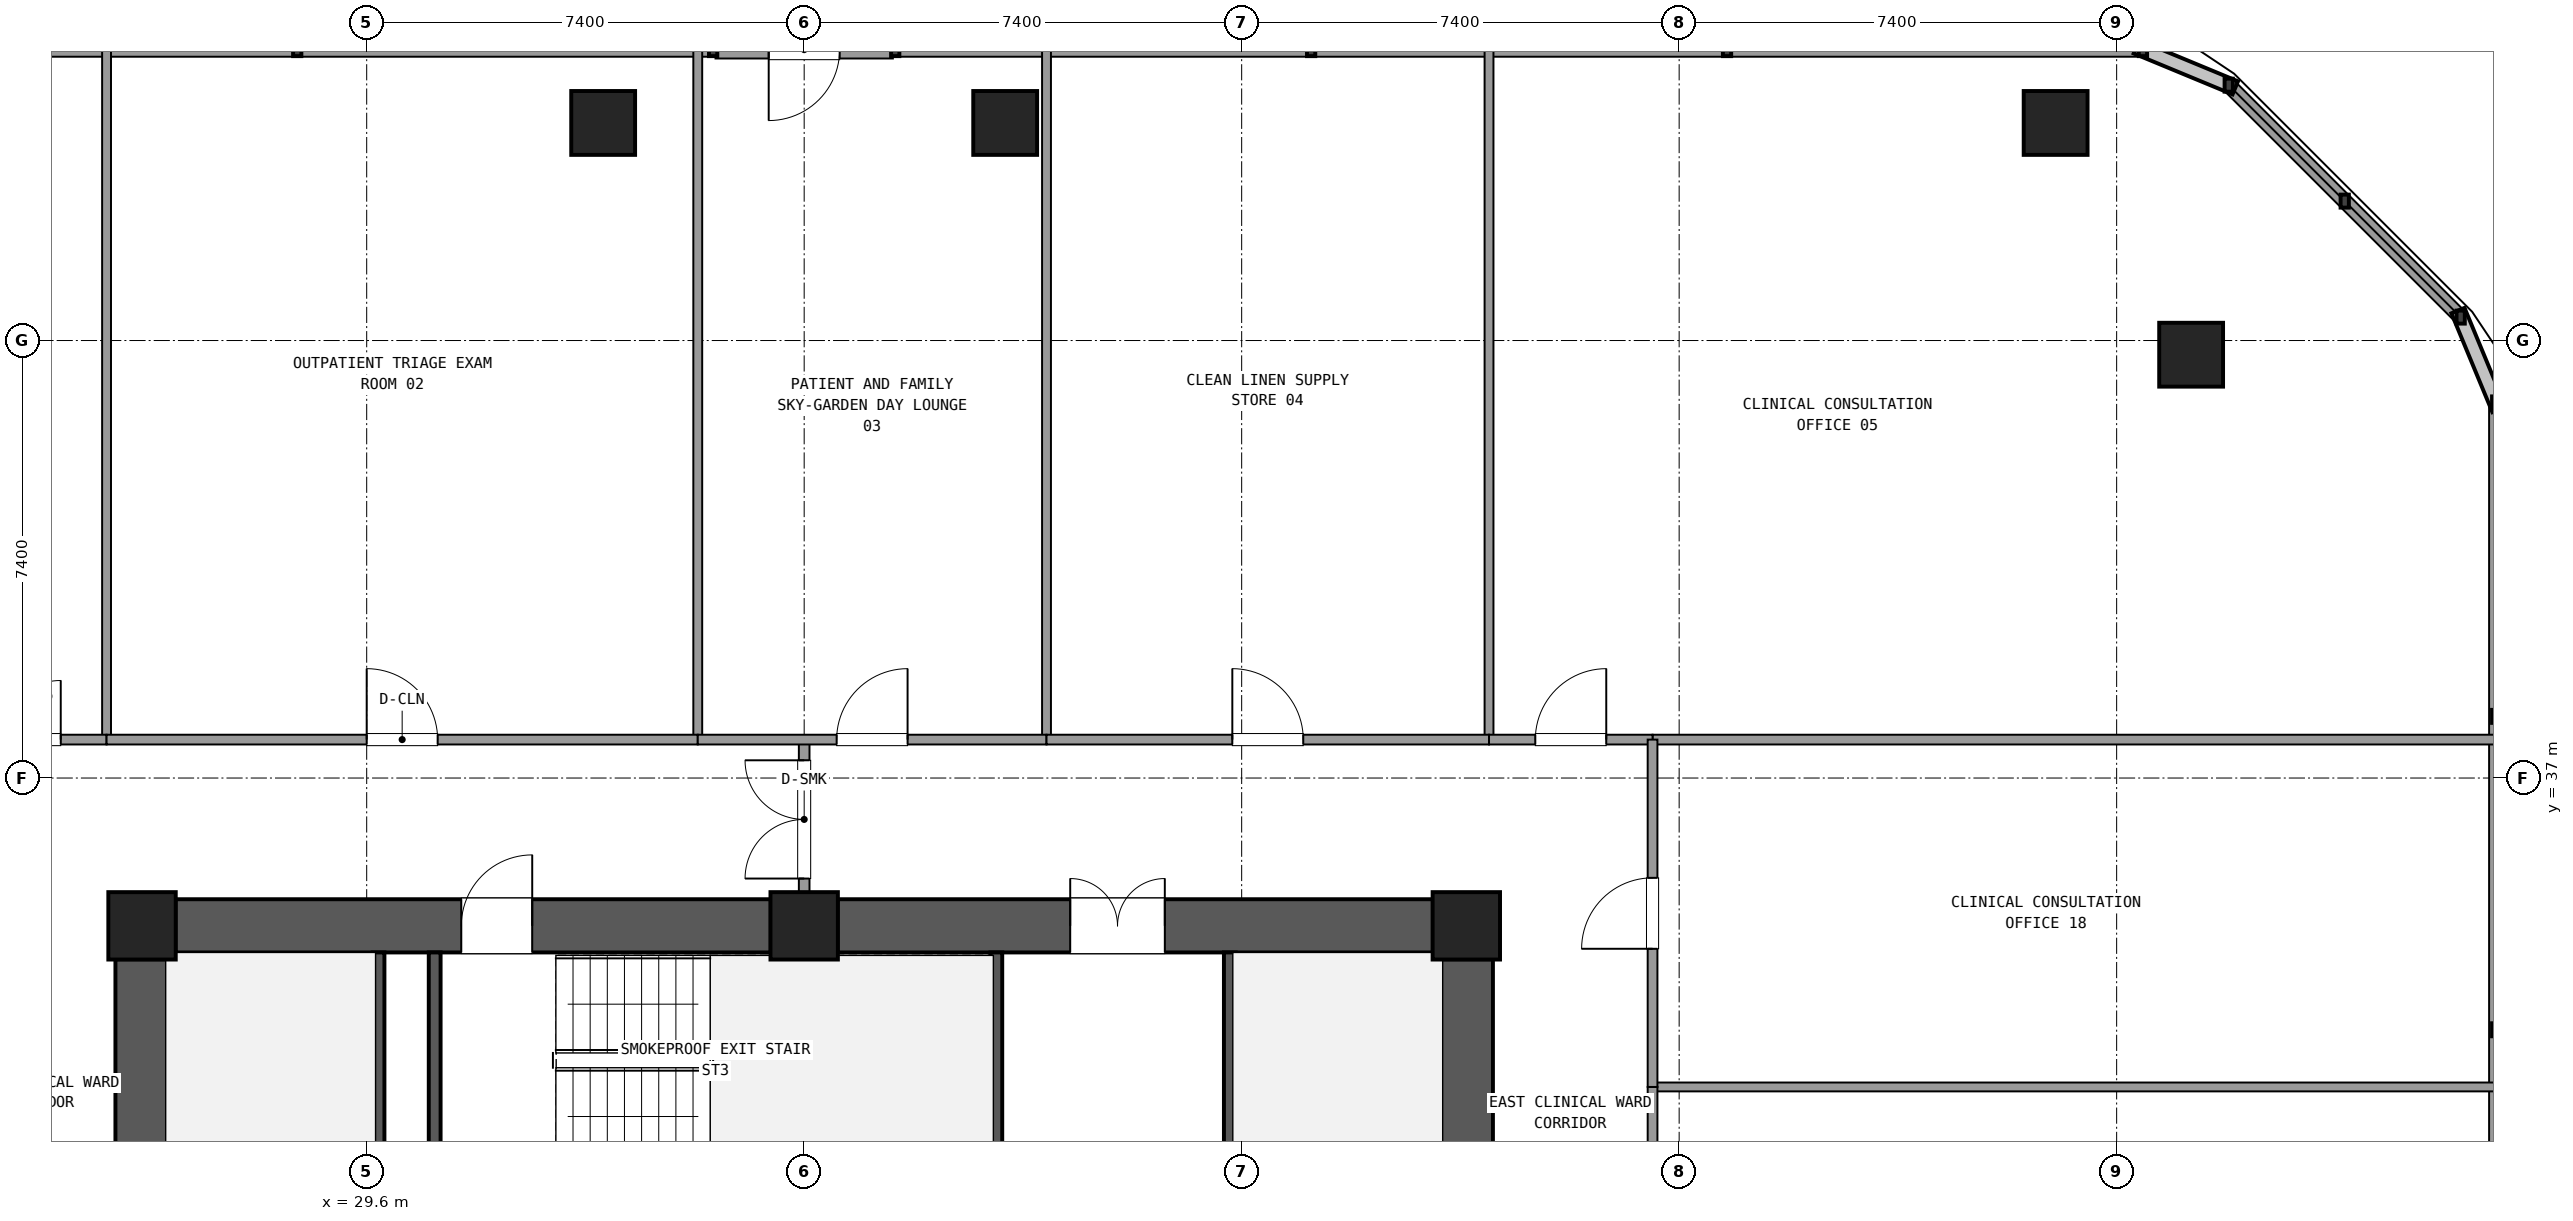
"""IFC4 building model, lengths in metres.
Left out: names, types, materials, properties, quantities, classifications, styles, units other than length and angle.
Written with IfcOpenShell. Run it as: python <this file> out.ifc"""

import sys

from ifc_helpers import new_model, si_unit, direction, frame, frame_2d, origin, origin_2d, place, context, subcontext, project, spatial, rectangle, extrude, element, fill, save


model = new_model("IFC4")
c1 = context("Model", 3, precision=1e-05, world=origin(), true_north=direction((0.0, 1.0)))
c2 = subcontext(c1, "Body", "Model", "MODEL_VIEW")
j1 = project(units=[si_unit("LENGTHUNIT", "METRE"), si_unit("PLANEANGLEUNIT", "RADIAN")], contexts=[c1])
p1 = place(None, origin())
s1 = spatial("IfcSite", under=j1, at=p1, CompositionType="ELEMENT")
p2 = place(p1, origin())
s2 = spatial("IfcBuilding", under=s1, at=p2, CompositionType="ELEMENT")
p3 = place(p2, frame((0.0, 0.0, 45.54)))
s3 = spatial("IfcBuildingStorey", under=s2, at=p3, CompositionType="ELEMENT", Elevation=45.54)
for number, where, z_axis, x_axis in (
    (1, (48.2, 34.5, 0.0), (0.0, 0.0, 1.0), (1.0, 0.0, 0.0)),
    (2, (37.0, 34.5, 0.0), (0.0, 0.0, 1.0), (1.0, 0.0, 0.0)),
    (3, (25.8, 34.5, 0.0), (0.0, 0.0, 1.0), (1.0, 0.0, 0.0)),
):
    element("IfcColumn", number, at=place(p3, frame(where, z_axis=z_axis, x_axis=x_axis)), inside=s3, PredefinedType="COLUMN", context=c2, shape_type="SweptSolid", body=[
        extrude(rectangle(XDim=1.14, YDim=1.14, at=origin_2d()), origin(), (0.0, 0.0, 1.0), 3.6),
    ])
p4 = place(p3, frame((48.2, 26.465, 0.0), z_axis=(0.0, 0.0, 1.0), x_axis=(0.0, 1.0, 0.0)))
e4 = element("IfcWall", 4, at=p4, inside=s3, PredefinedType="SHEAR", context=c2, shape_type="SweptSolid", body=[
    extrude(rectangle(XDim=7.47, YDim=0.9, at=frame_2d((3.735, 0.0))), origin(), (0.0, 0.0, 1.0), 3.32),
])
p5 = place(p3, frame((47.635, 34.5, 0.0), z_axis=(0.0, 0.0, 1.0), x_axis=(-1.0, 0.0, 0.0)))
e5 = element("IfcWall", 5, at=p5, inside=s3, PredefinedType="SHEAR", context=c2, shape_type="SweptSolid", body=[
    extrude(rectangle(XDim=10.07, YDim=0.9, at=frame_2d((5.035, 0.0))), origin(), (0.0, 0.0, 1.0), 3.32),
])
p6 = place(p5, frame((4.535, 0.0, 0.0)))
e6 = element("IfcOpeningElement", 6, at=p6, cuts=e5, PredefinedType="OPENING", context=c2, shape_type="SweptSolid", body=[
    extrude(rectangle(XDim=1.6, YDim=2.2, at=frame_2d((0.8, 1.1))), frame((0.0, 0.46, 0.0), z_axis=(0.0, -1.0, 0.0), x_axis=(1.0, 0.0, 0.0)), (0.0, 0.0, 1.0), 0.92),
])
p7 = place(p3, frame((36.435, 34.5, 0.0), z_axis=(0.0, 0.0, 1.0), x_axis=(-1.0, 0.0, 0.0)))
e7 = element("IfcWall", 7, at=p7, inside=s3, PredefinedType="SHEAR", context=c2, shape_type="SweptSolid", body=[
    extrude(rectangle(XDim=10.07, YDim=0.9, at=frame_2d((5.035, 0.0))), origin(), (0.0, 0.0, 1.0), 3.32),
])
p8 = place(p7, frame((4.035, 0.0, 0.0)))
e8 = element("IfcOpeningElement", 8, at=p8, cuts=e7, PredefinedType="OPENING", context=c2, shape_type="SweptSolid", body=[
    extrude(rectangle(XDim=1.2, YDim=2.15, at=frame_2d((0.6, 1.075))), frame((0.0, 0.46, 0.0), z_axis=(0.0, -1.0, 0.0), x_axis=(1.0, 0.0, 0.0)), (0.0, 0.0, 1.0), 0.92),
])
p9 = place(p3, frame((25.8, 33.935, 0.0), z_axis=(0.0, 0.0, 1.0), x_axis=(0.0, -1.0, 0.0)))
e9 = element("IfcWall", 9, at=p9, inside=s3, PredefinedType="SHEAR", context=c2, shape_type="SweptSolid", body=[
    extrude(rectangle(XDim=7.47, YDim=0.9, at=frame_2d((3.735, 0.0))), origin(), (0.0, 0.0, 1.0), 3.32),
])
for number, where, z_axis, x_axis in (
    (10, (60.46, 44.16, 0.0), (0.0, 0.0, 1.0), (1.0, 0.0, 0.0)),
    (11, (58.168, 48.08, 0.0), (0.0, 0.0, 1.0), (1.0, 0.0, 0.0)),
    (12, (40.4, 48.08, 0.0), (0.0, 0.0, 1.0), (1.0, 0.0, 0.0)),
    (13, (33.6, 48.08, 0.0), (0.0, 0.0, 1.0), (1.0, 0.0, 0.0)),
):
    element("IfcColumn", number, at=place(p3, frame(where, z_axis=z_axis, x_axis=x_axis)), inside=s3, PredefinedType="COLUMN", context=c2, shape_type="SweptSolid", body=[
        extrude(rectangle(XDim=1.08, YDim=1.08, at=origin_2d()), origin(), (0.0, 0.0, 1.0), 3.6),
    ])
p10 = place(p3, frame((65.62, 27.44, 0.0), z_axis=(0.0, 0.0, 1.0), x_axis=(0.0, 1.0, 0.0)))
e14 = element("IfcWall", 14, at=p10, inside=s3, PredefinedType="SOLIDWALL", context=c2, shape_type="SweptSolid", body=[
    extrude(rectangle(XDim=15.905, YDim=0.24, at=frame_2d((7.953, 0.0))), origin(), (0.0, 0.0, 1.0), 0.85),
])
p11 = place(p3, frame((65.019, 44.796, 0.0), z_axis=(0.0, 0.0, 1.0), x_axis=(-0.707106781187, 0.707106781187, 0.0)))
e15 = element("IfcWall", 15, at=p11, inside=s3, PredefinedType="SOLIDWALL", context=c2, shape_type="SweptSolid", body=[
    extrude(rectangle(XDim=5.548, YDim=0.24, at=frame_2d((2.774, 0.0))), origin(), (0.0, 0.0, 1.0), 0.85),
])
p12 = place(p3, frame((38.5, 49.32, 0.0), z_axis=(0.0, 0.0, 1.0), x_axis=(-1.0, 0.0, 0.0)))
e16 = element("IfcWall", 16, at=p12, inside=s3, PredefinedType="SOLIDWALL", context=c2, shape_type="SweptSolid", body=[
    extrude(rectangle(XDim=3.0, YDim=0.3, at=frame_2d((1.5, 0.0))), origin(), (0.0, 0.0, 1.0), 2.65),
])
p13 = place(p12, frame((0.9, 0.0, 0.0)))
e17 = element("IfcOpeningElement", 17, at=p13, cuts=e16, PredefinedType="OPENING", context=c2, shape_type="SweptSolid", body=[
    extrude(rectangle(XDim=1.2, YDim=2.2, at=frame_2d((0.6, 1.1))), frame((0.0, 0.16, 0.0), z_axis=(0.0, -1.0, 0.0), x_axis=(1.0, 0.0, 0.0)), (0.0, 0.0, 1.0), 0.32),
])
for number, where, z_axis, x_axis in (
    (18, (59.645, 49.32, 0.0), (0.0, 0.0, 1.0), (-1.0, 0.0, 0.0)),
    (19, (35.46, 49.32, 0.0), (0.0, 0.0, 1.0), (-1.0, 0.0, 0.0)),
):
    element("IfcWall", number, at=place(p3, frame(where, z_axis=z_axis, x_axis=x_axis)), inside=s3, PredefinedType="SOLIDWALL", context=c2, shape_type="SweptSolid", body=[
        extrude(rectangle(XDim=21.105, YDim=0.24, at=frame_2d((10.552, 0.0))), origin(), (0.0, 0.0, 1.0), 0.85),
    ])
for number, where, z_axis, x_axis in (
    (20, (29.8, 24.65, 0.0), (0.0, 0.0, 1.0), (0.0, 1.0, 0.0)),
    (21, (44.2, 24.65, 0.0), (0.0, 0.0, 1.0), (0.0, 1.0, 0.0)),
):
    element("IfcWall", number, at=place(p3, frame(where, z_axis=z_axis, x_axis=x_axis)), inside=s3, PredefinedType="SHEAR", context=c2, shape_type="SweptSolid", body=[
        extrude(rectangle(XDim=9.4, YDim=0.2, at=frame_2d((4.7, 0.0))), origin(), (0.0, 0.0, 1.0), 3.32),
    ])
for number, where, z_axis, x_axis in (
    (22, (30.75, 30.36, 0.0), (0.0, 0.0, 1.0), (0.0, 1.0, 0.0)),
    (23, (40.25, 30.36, 0.0), (0.0, 0.0, 1.0), (0.0, 1.0, 0.0)),
):
    element("IfcWall", number, at=place(p3, frame(where, z_axis=z_axis, x_axis=x_axis)), inside=s3, PredefinedType="SHEAR", context=c2, shape_type="SweptSolid", body=[
        extrude(rectangle(XDim=3.69, YDim=0.2, at=frame_2d((1.845, 0.0))), origin(), (0.0, 0.0, 1.0), 3.32),
    ])
p14 = place(p3, frame((37.0, 34.95, 0.0), z_axis=(0.0, 0.0, 1.0), x_axis=(0.0, 1.0, 0.0)))
e24 = element("IfcWall", 24, at=p14, inside=s3, PredefinedType="PARTITIONING", context=c2, shape_type="SweptSolid", body=[
    extrude(rectangle(XDim=2.7, YDim=0.18, at=frame_2d((1.35, 0.0))), origin(), (0.0, 0.0, 1.0), 2.61),
])
p15 = place(p14, frame((0.35, 0.0, 0.0)))
e25 = element("IfcOpeningElement", 25, at=p15, cuts=e24, PredefinedType="OPENING", context=c2, shape_type="SweptSolid", body=[
    extrude(rectangle(XDim=2.0, YDim=2.2, at=frame_2d((1.0, 1.1))), frame((0.0, 0.1, 0.0), z_axis=(0.0, -1.0, 0.0), x_axis=(1.0, 0.0, 0.0)), (0.0, 0.0, 1.0), 0.2),
])
p16 = place(p3, frame((51.35, 37.65, 0.0), z_axis=(0.0, 0.0, 1.0), x_axis=(1.0, 0.0, 0.0)))
e26 = element("IfcWall", 26, at=p16, inside=s3, PredefinedType="PARTITIONING", context=c2, shape_type="SweptSolid", body=[
    extrude(rectangle(XDim=14.25, YDim=0.165, at=frame_2d((7.125, 0.0))), origin(), (0.0, 0.0, 1.0), 2.61),
])
p17 = place(p3, frame((25.2, 37.65, 0.0), z_axis=(0.0, 0.0, 1.0), x_axis=(0.0, 1.0, 0.0)))
e27 = element("IfcWall", 27, at=p17, inside=s3, PredefinedType="PARTITIONING", context=c2, shape_type="SweptSolid", body=[
    extrude(rectangle(XDim=11.65, YDim=0.15, at=frame_2d((5.825, 0.0))), origin(), (0.0, 0.0, 1.0), 2.61),
])
p18 = place(p3, frame((22.65, 37.65, 0.0), z_axis=(0.0, 0.0, 1.0), x_axis=(1.0, 0.0, 0.0)))
e28 = element("IfcWall", 28, at=p18, inside=s3, PredefinedType="PARTITIONING", context=c2, shape_type="SweptSolid", body=[
    extrude(rectangle(XDim=2.55, YDim=0.165, at=frame_2d((1.275, 0.0))), origin(), (0.0, 0.0, 1.0), 2.61),
])
p19 = place(p18, frame((0.775, 0.0, 0.0)))
e29 = element("IfcOpeningElement", 29, at=p19, cuts=e28, PredefinedType="OPENING", context=c2, shape_type="SweptSolid", body=[
    extrude(rectangle(XDim=1.0, YDim=2.15, at=frame_2d((0.5, 1.075))), frame((0.0, 0.093, 0.0), z_axis=(0.0, -1.0, 0.0), x_axis=(1.0, 0.0, 0.0)), (0.0, 0.0, 1.0), 0.185),
])
p20 = place(p3, frame((35.2, 37.65, 0.0), z_axis=(0.0, 0.0, 1.0), x_axis=(0.0, 1.0, 0.0)))
e30 = element("IfcWall", 30, at=p20, inside=s3, PredefinedType="PARTITIONING", context=c2, shape_type="SweptSolid", body=[
    extrude(rectangle(XDim=11.65, YDim=0.15, at=frame_2d((5.825, 0.0))), origin(), (0.0, 0.0, 1.0), 2.61),
])
p21 = place(p3, frame((25.2, 37.65, 0.0), z_axis=(0.0, 0.0, 1.0), x_axis=(1.0, 0.0, 0.0)))
e31 = element("IfcWall", 31, at=p21, inside=s3, PredefinedType="PARTITIONING", context=c2, shape_type="SweptSolid", body=[
    extrude(rectangle(XDim=10.0, YDim=0.165, at=frame_2d((5.0, 0.0))), origin(), (0.0, 0.0, 1.0), 2.61),
])
p22 = place(p21, frame((4.4, 0.0, 0.0)))
e32 = element("IfcOpeningElement", 32, at=p22, cuts=e31, PredefinedType="OPENING", context=c2, shape_type="SweptSolid", body=[
    extrude(rectangle(XDim=1.2, YDim=2.15, at=frame_2d((0.6, 1.075))), frame((0.0, 0.093, 0.0), z_axis=(0.0, -1.0, 0.0), x_axis=(1.0, 0.0, 0.0)), (0.0, 0.0, 1.0), 0.185),
])
p23 = place(p3, frame((41.099, 37.65, 0.0), z_axis=(0.0, 0.0, 1.0), x_axis=(0.0, 1.0, 0.0)))
e33 = element("IfcWall", 33, at=p23, inside=s3, PredefinedType="PARTITIONING", context=c2, shape_type="SweptSolid", body=[
    extrude(rectangle(XDim=11.65, YDim=0.15, at=frame_2d((5.825, 0.0))), origin(), (0.0, 0.0, 1.0), 2.61),
])
p24 = place(p3, frame((35.2, 37.65, 0.0), z_axis=(0.0, 0.0, 1.0), x_axis=(1.0, 0.0, 0.0)))
e34 = element("IfcWall", 34, at=p24, inside=s3, PredefinedType="PARTITIONING", context=c2, shape_type="SweptSolid", body=[
    extrude(rectangle(XDim=5.899, YDim=0.165, at=frame_2d((2.95, 0.0))), origin(), (0.0, 0.0, 1.0), 2.61),
])
p25 = place(p24, frame((2.349, 0.0, 0.0)))
e35 = element("IfcOpeningElement", 35, at=p25, cuts=e34, PredefinedType="OPENING", context=c2, shape_type="SweptSolid", body=[
    extrude(rectangle(XDim=1.2, YDim=2.15, at=frame_2d((0.6, 1.075))), frame((0.0, 0.093, 0.0), z_axis=(0.0, -1.0, 0.0), x_axis=(1.0, 0.0, 0.0)), (0.0, 0.0, 1.0), 0.185),
])
p26 = place(p3, frame((48.584, 37.65, 0.0), z_axis=(0.0, 0.0, 1.0), x_axis=(0.0, 1.0, 0.0)))
e36 = element("IfcWall", 36, at=p26, inside=s3, PredefinedType="PARTITIONING", context=c2, shape_type="SweptSolid", body=[
    extrude(rectangle(XDim=11.65, YDim=0.15, at=frame_2d((5.825, 0.0))), origin(), (0.0, 0.0, 1.0), 2.61),
])
p27 = place(p3, frame((41.099, 37.65, 0.0), z_axis=(0.0, 0.0, 1.0), x_axis=(1.0, 0.0, 0.0)))
e37 = element("IfcWall", 37, at=p27, inside=s3, PredefinedType="PARTITIONING", context=c2, shape_type="SweptSolid", body=[
    extrude(rectangle(XDim=7.485, YDim=0.165, at=frame_2d((3.742, 0.0))), origin(), (0.0, 0.0, 1.0), 2.61),
])
p28 = place(p27, frame((3.143, 0.0, 0.0)))
e38 = element("IfcOpeningElement", 38, at=p28, cuts=e37, PredefinedType="OPENING", context=c2, shape_type="SweptSolid", body=[
    extrude(rectangle(XDim=1.2, YDim=2.15, at=frame_2d((0.6, 1.075))), frame((0.0, 0.093, 0.0), z_axis=(0.0, -1.0, 0.0), x_axis=(1.0, 0.0, 0.0)), (0.0, 0.0, 1.0), 0.185),
])
p29 = place(p3, frame((48.584, 37.65, 0.0), z_axis=(0.0, 0.0, 1.0), x_axis=(1.0, 0.0, 0.0)))
e39 = element("IfcWall", 39, at=p29, inside=s3, PredefinedType="PARTITIONING", context=c2, shape_type="SweptSolid", body=[
    extrude(rectangle(XDim=2.766, YDim=0.165, at=frame_2d((1.383, 0.0))), origin(), (0.0, 0.0, 1.0), 2.61),
])
p30 = place(p29, frame((0.783, 0.0, 0.0)))
e40 = element("IfcOpeningElement", 40, at=p30, cuts=e39, PredefinedType="OPENING", context=c2, shape_type="SweptSolid", body=[
    extrude(rectangle(XDim=1.2, YDim=2.15, at=frame_2d((0.6, 1.075))), frame((0.0, 0.093, 0.0), z_axis=(0.0, -1.0, 0.0), x_axis=(1.0, 0.0, 0.0)), (0.0, 0.0, 1.0), 0.185),
])
p31 = place(p3, frame((51.35, 31.775, 0.0), z_axis=(0.0, 0.0, 1.0), x_axis=(1.0, 0.0, 0.0)))
e41 = element("IfcWall", 41, at=p31, inside=s3, PredefinedType="PARTITIONING", context=c2, shape_type="SweptSolid", body=[
    extrude(rectangle(XDim=14.25, YDim=0.15, at=frame_2d((7.125, 0.0))), origin(), (0.0, 0.0, 1.0), 2.61),
])
p32 = place(p3, frame((51.35, 24.1, 0.0), z_axis=(0.0, 0.0, 1.0), x_axis=(0.0, 1.0, 0.0)))
e42 = element("IfcWall", 42, at=p32, inside=s3, PredefinedType="PARTITIONING", context=c2, shape_type="SweptSolid", body=[
    extrude(rectangle(XDim=7.675, YDim=0.165, at=frame_2d((3.837, 0.0))), origin(), (0.0, 0.0, 1.0), 2.61),
])
p33 = place(p32, frame((3.237, 0.0, 0.0)))
e43 = element("IfcOpeningElement", 43, at=p33, cuts=e42, PredefinedType="OPENING", context=c2, shape_type="SweptSolid", body=[
    extrude(rectangle(XDim=1.2, YDim=2.15, at=frame_2d((0.6, 1.075))), frame((0.0, 0.093, 0.0), z_axis=(0.0, -1.0, 0.0), x_axis=(1.0, 0.0, 0.0)), (0.0, 0.0, 1.0), 0.185),
])
p34 = place(p3, frame((51.35, 31.775, 0.0), z_axis=(0.0, 0.0, 1.0), x_axis=(0.0, 1.0, 0.0)))
e44 = element("IfcWall", 44, at=p34, inside=s3, PredefinedType="PARTITIONING", context=c2, shape_type="SweptSolid", body=[
    extrude(rectangle(XDim=5.875, YDim=0.165, at=frame_2d((2.938, 0.0))), origin(), (0.0, 0.0, 1.0), 2.61),
])
p35 = place(p34, frame((2.337, 0.0, 0.0)))
e45 = element("IfcOpeningElement", 45, at=p35, cuts=e44, PredefinedType="OPENING", context=c2, shape_type="SweptSolid", body=[
    extrude(rectangle(XDim=1.2, YDim=2.15, at=frame_2d((0.6, 1.075))), frame((0.0, 0.093, 0.0), z_axis=(0.0, -1.0, 0.0), x_axis=(1.0, 0.0, 0.0)), (0.0, 0.0, 1.0), 0.185),
])
p36 = place(p6, frame((1.6, 0.0, 0.0), z_axis=(0.0, 0.0, 1.0), x_axis=(-1.0, 0.0, 0.0)))
e46 = element("IfcDoor", 46, at=p36, inside=s3, OperationType="DOUBLE_DOOR_SINGLE_SWING", PredefinedType="DOOR", context=c2, shape_type="SweptSolid", body=[
    extrude(rectangle(XDim=1.6, YDim=2.2, at=frame_2d((0.8, 1.1))), frame((0.0, 0.025, 0.0), z_axis=(0.0, -1.0, 0.0), x_axis=(1.0, 0.0, 0.0)), (0.0, 0.0, 1.0), 0.05),
])
fill(e6, e46)
p37 = place(p8, frame((1.2, 0.0, 0.0), z_axis=(0.0, 0.0, 1.0), x_axis=(-1.0, 0.0, 0.0)))
e47 = element("IfcDoor", 47, at=p37, inside=s3, OperationType="SINGLE_SWING_LEFT", PredefinedType="DOOR", context=c2, shape_type="SweptSolid", body=[
    extrude(rectangle(XDim=1.2, YDim=2.15, at=frame_2d((0.6, 1.075))), frame((0.0, 0.025, 0.0), z_axis=(0.0, -1.0, 0.0), x_axis=(1.0, 0.0, 0.0)), (0.0, 0.0, 1.0), 0.05),
])
fill(e8, e47)
p38 = place(p15, origin())
e48 = element("IfcDoor", 48, at=p38, inside=s3, OperationType="DOUBLE_DOOR_SINGLE_SWING", PredefinedType="DOOR", context=c2, shape_type="SweptSolid", body=[
    extrude(rectangle(XDim=2.0, YDim=2.2, at=frame_2d((1.0, 1.1))), frame((0.0, 0.025, 0.0), z_axis=(0.0, -1.0, 0.0), x_axis=(1.0, 0.0, 0.0)), (0.0, 0.0, 1.0), 0.05),
])
fill(e25, e48)
p39 = place(p19, origin())
e49 = element("IfcDoor", 49, at=p39, inside=s3, OperationType="SINGLE_SWING_RIGHT", PredefinedType="DOOR", context=c2, shape_type="SweptSolid", body=[
    extrude(rectangle(XDim=1.0, YDim=2.15, at=frame_2d((0.5, 1.075))), frame((0.0, 0.025, 0.0), z_axis=(0.0, -1.0, 0.0), x_axis=(1.0, 0.0, 0.0)), (0.0, 0.0, 1.0), 0.05),
])
fill(e29, e49)
p40 = place(p22, origin())
e50 = element("IfcDoor", 50, at=p40, inside=s3, OperationType="SINGLE_SWING_LEFT", PredefinedType="DOOR", context=c2, shape_type="SweptSolid", body=[
    extrude(rectangle(XDim=1.2, YDim=2.15, at=frame_2d((0.6, 1.075))), frame((0.0, 0.025, 0.0), z_axis=(0.0, -1.0, 0.0), x_axis=(1.0, 0.0, 0.0)), (0.0, 0.0, 1.0), 0.05),
])
fill(e32, e50)
p41 = place(p25, origin())
e51 = element("IfcDoor", 51, at=p41, inside=s3, OperationType="SINGLE_SWING_RIGHT", PredefinedType="DOOR", context=c2, shape_type="SweptSolid", body=[
    extrude(rectangle(XDim=1.2, YDim=2.15, at=frame_2d((0.6, 1.075))), frame((0.0, 0.025, 0.0), z_axis=(0.0, -1.0, 0.0), x_axis=(1.0, 0.0, 0.0)), (0.0, 0.0, 1.0), 0.05),
])
fill(e35, e51)
p42 = place(p28, origin())
e52 = element("IfcDoor", 52, at=p42, inside=s3, OperationType="SINGLE_SWING_LEFT", PredefinedType="DOOR", context=c2, shape_type="SweptSolid", body=[
    extrude(rectangle(XDim=1.2, YDim=2.15, at=frame_2d((0.6, 1.075))), frame((0.0, 0.025, 0.0), z_axis=(0.0, -1.0, 0.0), x_axis=(1.0, 0.0, 0.0)), (0.0, 0.0, 1.0), 0.05),
])
fill(e38, e52)
p43 = place(p30, origin())
e53 = element("IfcDoor", 53, at=p43, inside=s3, OperationType="SINGLE_SWING_RIGHT", PredefinedType="DOOR", context=c2, shape_type="SweptSolid", body=[
    extrude(rectangle(XDim=1.2, YDim=2.15, at=frame_2d((0.6, 1.075))), frame((0.0, 0.025, 0.0), z_axis=(0.0, -1.0, 0.0), x_axis=(1.0, 0.0, 0.0)), (0.0, 0.0, 1.0), 0.05),
])
fill(e40, e53)
p44 = place(p35, origin())
e54 = element("IfcDoor", 54, at=p44, inside=s3, OperationType="SINGLE_SWING_LEFT", PredefinedType="DOOR", context=c2, shape_type="SweptSolid", body=[
    extrude(rectangle(XDim=1.2, YDim=2.15, at=frame_2d((0.6, 1.075))), frame((0.0, 0.025, 0.0), z_axis=(0.0, -1.0, 0.0), x_axis=(1.0, 0.0, 0.0)), (0.0, 0.0, 1.0), 0.05),
])
fill(e45, e54)
save(model, sys.argv[1])
